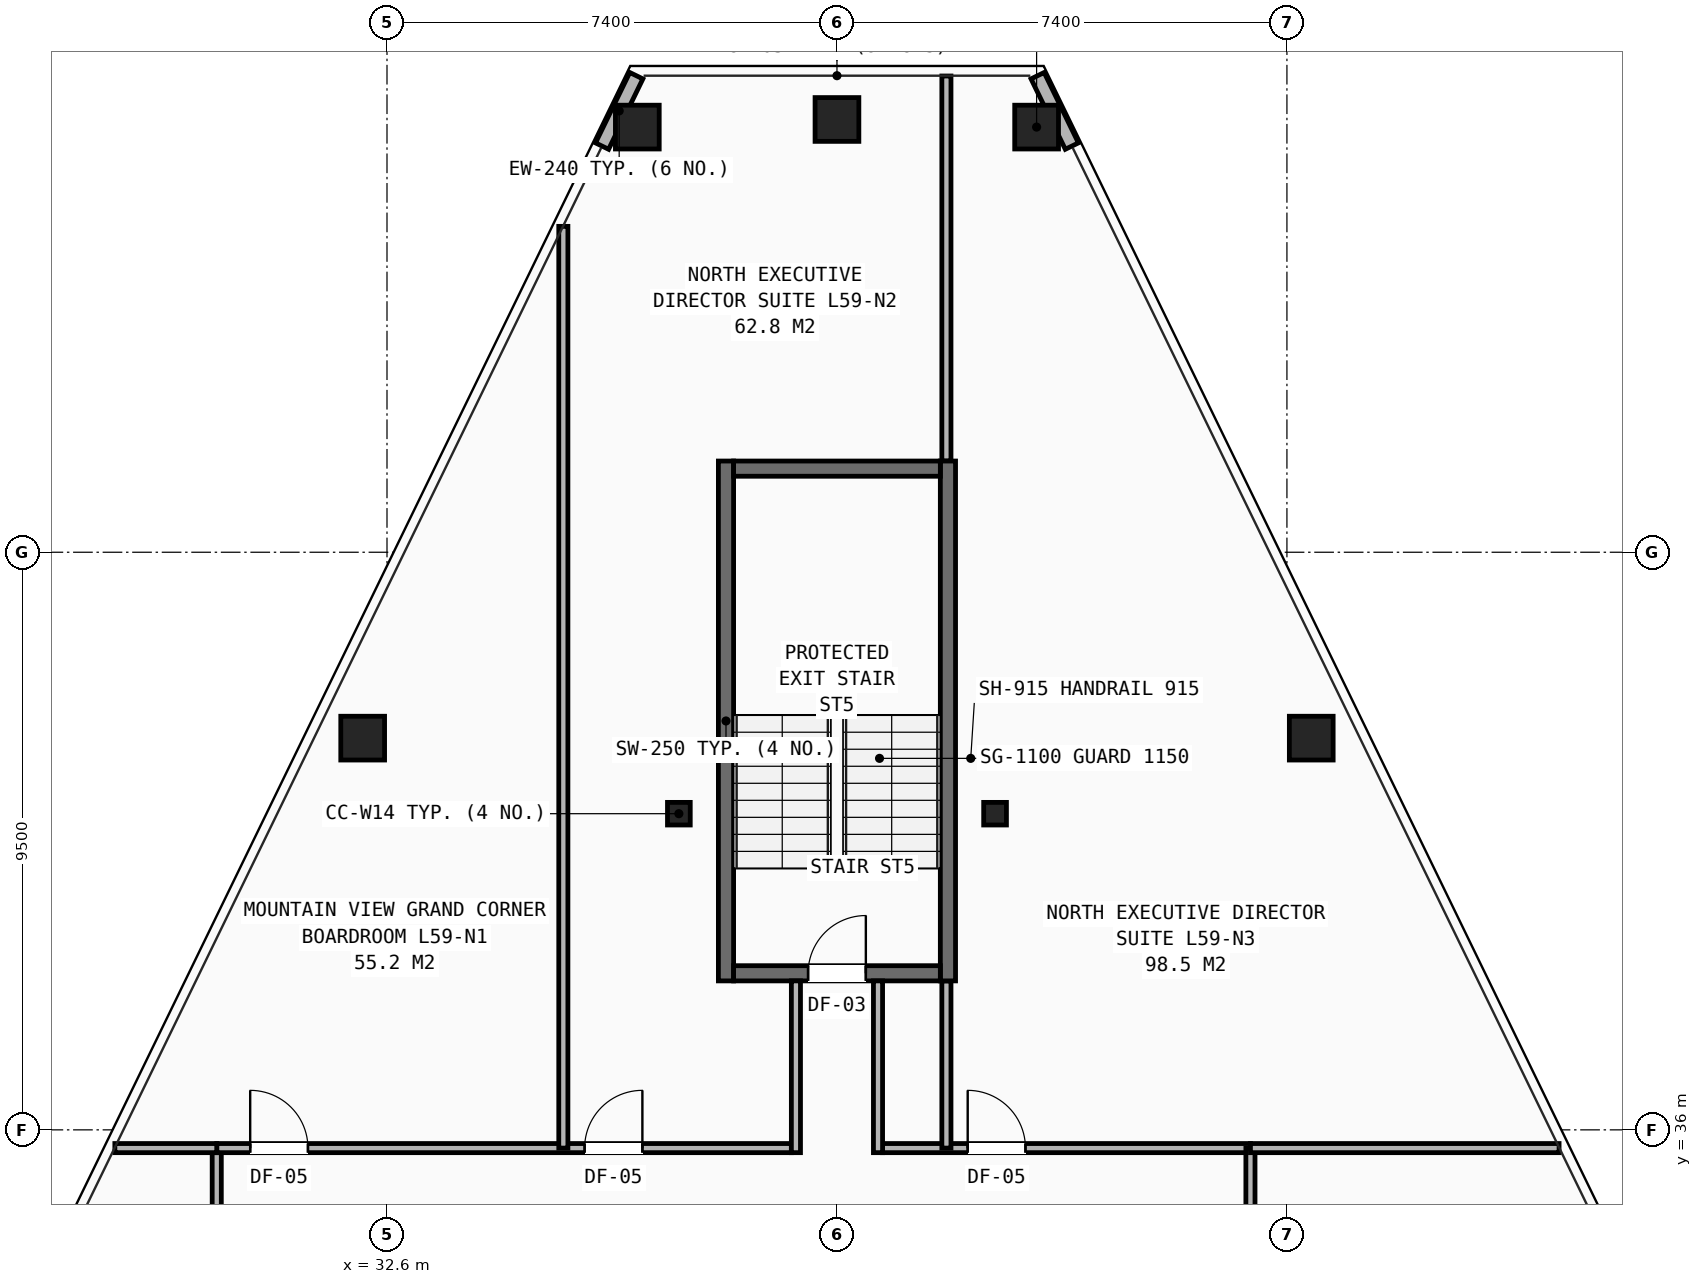
"""IFC4 building model, lengths in metres.
Left out: names, types, materials, properties, quantities, classifications, styles, units other than length and angle.
Written with IfcOpenShell. Run it as: python <this file> out.ifc"""

import sys

from ifc_helpers import new_model, si_unit, direction, frame, frame_2d, origin, origin_2d, place, context, subcontext, project, spatial, rectangle, hollow_rectangle, i_section, extrude, element, fill, save


model = new_model("IFC4")
c1 = context("Model", 3, precision=1e-05, world=origin(), true_north=direction((0.0, 1.0)))
c2 = subcontext(c1, "Body", "Model", "MODEL_VIEW")
j1 = project(units=[si_unit("LENGTHUNIT", "METRE"), si_unit("PLANEANGLEUNIT", "RADIAN")], contexts=[c1])
p1 = place(None, origin())
s1 = spatial("IfcSite", under=j1, at=p1, CompositionType="ELEMENT")
p2 = place(p1, origin())
s2 = spatial("IfcBuilding", under=s1, at=p2, CompositionType="ELEMENT")
p3 = place(p2, frame((0.0, 0.0, 208.4)))
s3 = spatial("IfcBuildingStorey", under=s2, at=p3, CompositionType="ELEMENT", Elevation=208.4)
for number, where, z_axis, x_axis in (
    (1, (37.4, 41.2, 0.0), (0.0, 0.0, 1.0), (1.0, 0.0, 0.0)),
    (2, (42.6, 41.2, 0.0), (0.0, 0.0, 1.0), (1.0, 0.0, 0.0)),
):
    element("IfcColumn", number, at=place(p3, frame(where, z_axis=z_axis, x_axis=x_axis)), inside=s3, PredefinedType="COLUMN", context=c2, shape_type="SweptSolid", body=[
        extrude(i_section(OverallWidth=0.374, OverallDepth=0.372, WebThickness=0.016, FlangeThickness=0.026, at=origin_2d()), origin(), (0.0, 0.0, 1.0), 3.5),
    ])
for number, where, z_axis, x_axis in (
    (3, (43.283, 52.492, 0.0), (0.0, 0.0, 1.0), (1.0, 0.0, 0.0)),
    (4, (40.0, 52.618, 0.0), (0.0, 0.0, 1.0), (1.0, 0.0, 0.0)),
    (5, (36.717, 52.492, 0.0), (0.0, 0.0, 1.0), (1.0, 0.0, 0.0)),
    (6, (32.2, 42.443, 0.0), (0.0, 0.0, 1.0), (1.0, 0.0, 0.0)),
    (7, (47.8, 42.443, 0.0), (0.0, 0.0, 1.0), (1.0, 0.0, 0.0)),
):
    element("IfcColumn", number, at=place(p3, frame(where, z_axis=z_axis, x_axis=x_axis)), inside=s3, PredefinedType="COLUMN", context=c2, shape_type="SweptSolid", body=[
        extrude(hollow_rectangle(XDim=0.72, YDim=0.72, WallThickness=0.05, at=origin_2d()), origin(), (0.0, 0.0, 1.0), 3.5),
    ])
for number, where, z_axis, x_axis in (
    (8, (36.7, 53.338, 0.0), (0.0, 0.0, 1.0), (-0.438, -0.899, 0.0)),
    (9, (43.863, 52.18, 0.0), (0.0, 0.0, 1.0), (-0.438, 0.899, 0.0)),
):
    element("IfcWall", number, at=place(p3, frame(where, z_axis=z_axis, x_axis=x_axis)), inside=s3, PredefinedType="SHEAR", context=c2, shape_type="SweptSolid", body=[
        extrude(rectangle(XDim=1.288, YDim=0.24, at=frame_2d((0.644, 0.0))), origin(), (0.0, 0.0, 1.0), 2.623),
    ])
p4 = place(p3, frame((29.8, 16.4, 0.0), z_axis=(0.0, 0.0, 1.0), x_axis=(0.0, 1.0, 0.0)))
e10 = element("IfcWall", 10, at=p4, inside=s3, PredefinedType="PARTITIONING", context=c2, shape_type="SweptSolid", body=[
    extrude(rectangle(XDim=19.3, YDim=0.15, at=frame_2d((9.65, 0.0))), origin(), (0.0, 0.0, 1.0), 2.292),
])
p5 = place(p4, frame((0.35, 0.0, 0.0)))
e11 = element("IfcOpeningElement", 11, at=p5, cuts=e10, PredefinedType="OPENING", context=c2, shape_type="SweptSolid", body=[
    extrude(rectangle(XDim=0.95, YDim=2.1, at=frame_2d((0.475, 1.05))), frame((0.0, 0.085, 0.0), z_axis=(0.0, -1.0, 0.0), x_axis=(1.0, 0.0, 0.0)), (0.0, 0.0, 1.0), 0.17),
])
p6 = place(p4, frame((4.45, 0.0, 0.0)))
e12 = element("IfcOpeningElement", 12, at=p6, cuts=e10, PredefinedType="OPENING", context=c2, shape_type="SweptSolid", body=[
    extrude(rectangle(XDim=0.95, YDim=2.1, at=frame_2d((0.475, 1.05))), frame((0.0, 0.085, 0.0), z_axis=(0.0, -1.0, 0.0), x_axis=(1.0, 0.0, 0.0)), (0.0, 0.0, 1.0), 0.17),
])
p7 = place(p4, frame((9.45, 0.0, 0.0)))
e13 = element("IfcOpeningElement", 13, at=p7, cuts=e10, PredefinedType="OPENING", context=c2, shape_type="SweptSolid", body=[
    extrude(rectangle(XDim=0.95, YDim=2.1, at=frame_2d((0.475, 1.05))), frame((0.0, 0.085, 0.0), z_axis=(0.0, -1.0, 0.0), x_axis=(1.0, 0.0, 0.0)), (0.0, 0.0, 1.0), 0.17),
])
p8 = place(p4, frame((14.75, 0.0, 0.0)))
e14 = element("IfcOpeningElement", 14, at=p8, cuts=e10, PredefinedType="OPENING", context=c2, shape_type="SweptSolid", body=[
    extrude(rectangle(XDim=0.95, YDim=2.1, at=frame_2d((0.475, 1.05))), frame((0.0, 0.085, 0.0), z_axis=(0.0, -1.0, 0.0), x_axis=(1.0, 0.0, 0.0)), (0.0, 0.0, 1.0), 0.17),
])
p9 = place(p3, frame((29.8, 35.7, 0.0), z_axis=(0.0, 0.0, 1.0), x_axis=(1.0, 0.0, 0.0)))
e15 = element("IfcWall", 15, at=p9, inside=s3, PredefinedType="PARTITIONING", context=c2, shape_type="SweptSolid", body=[
    extrude(rectangle(XDim=9.45, YDim=0.15, at=frame_2d((4.725, 0.0))), origin(), (0.0, 0.0, 1.0), 2.833),
])
p10 = place(p9, frame((0.55, 0.0, 0.0)))
e16 = element("IfcOpeningElement", 16, at=p10, cuts=e15, PredefinedType="OPENING", context=c2, shape_type="SweptSolid", body=[
    extrude(rectangle(XDim=0.95, YDim=2.1, at=frame_2d((0.475, 1.05))), frame((0.0, 0.085, 0.0), z_axis=(0.0, -1.0, 0.0), x_axis=(1.0, 0.0, 0.0)), (0.0, 0.0, 1.0), 0.17),
])
p11 = place(p9, frame((6.05, 0.0, 0.0)))
e17 = element("IfcOpeningElement", 17, at=p11, cuts=e15, PredefinedType="OPENING", context=c2, shape_type="SweptSolid", body=[
    extrude(rectangle(XDim=0.95, YDim=2.1, at=frame_2d((0.475, 1.05))), frame((0.0, 0.085, 0.0), z_axis=(0.0, -1.0, 0.0), x_axis=(1.0, 0.0, 0.0)), (0.0, 0.0, 1.0), 0.17),
])
p12 = place(p3, frame((40.75, 35.7, 0.0), z_axis=(0.0, 0.0, 1.0), x_axis=(1.0, 0.0, 0.0)))
e18 = element("IfcWall", 18, at=p12, inside=s3, PredefinedType="PARTITIONING", context=c2, shape_type="SweptSolid", body=[
    extrude(rectangle(XDim=6.05, YDim=0.15, at=frame_2d((3.025, 0.0))), origin(), (0.0, 0.0, 1.0), 3.25),
])
p13 = place(p12, frame((1.4, 0.0, 0.0)))
e19 = element("IfcOpeningElement", 19, at=p13, cuts=e18, PredefinedType="OPENING", context=c2, shape_type="SweptSolid", body=[
    extrude(rectangle(XDim=0.95, YDim=2.1, at=frame_2d((0.475, 1.05))), frame((0.0, 0.085, 0.0), z_axis=(0.0, -1.0, 0.0), x_axis=(1.0, 0.0, 0.0)), (0.0, 0.0, 1.0), 0.17),
])
p14 = place(p3, frame((46.8, 31.2, 0.0), z_axis=(0.0, 0.0, 1.0), x_axis=(0.0, 1.0, 0.0)))
e20 = element("IfcWall", 20, at=p14, inside=s3, PredefinedType="PARTITIONING", context=c2, shape_type="SweptSolid", body=[
    extrude(rectangle(XDim=4.5, YDim=0.15, at=frame_2d((2.25, 0.0))), origin(), (0.0, 0.0, 1.0), 2.705),
])
p15 = place(p3, frame((28.124, 35.7, 0.0), z_axis=(0.0, 0.0, 1.0), x_axis=(1.0, 0.0, 0.0)))
e21 = element("IfcWall", 21, at=p15, inside=s3, PredefinedType="PARTITIONING", context=c2, shape_type="SweptSolid", body=[
    extrude(rectangle(XDim=1.676, YDim=0.15, at=frame_2d((0.838, 0.0))), origin(), (0.0, 0.0, 1.0), 2.628),
])
p16 = place(p3, frame((46.8, 35.7, 0.0), z_axis=(0.0, 0.0, 1.0), x_axis=(1.0, 0.0, 0.0)))
e22 = element("IfcWall", 22, at=p16, inside=s3, PredefinedType="PARTITIONING", context=c2, shape_type="SweptSolid", body=[
    extrude(rectangle(XDim=5.076, YDim=0.15, at=frame_2d((2.538, 0.0))), origin(), (0.0, 0.0, 1.0), 2.628),
])
p17 = place(p3, frame((35.5, 35.7, 0.0), z_axis=(0.0, 0.0, 1.0), x_axis=(0.0, 1.0, 0.0)))
e23 = element("IfcWall", 23, at=p17, inside=s3, PredefinedType="PARTITIONING", context=c2, shape_type="SweptSolid", body=[
    extrude(rectangle(XDim=15.16, YDim=0.15, at=frame_2d((7.58, 0.0))), origin(), (0.0, 0.0, 1.0), 2.292),
])
p18 = place(p3, frame((41.8, 35.7, 0.0), z_axis=(0.0, 0.0, 1.0), x_axis=(0.0, 1.0, 0.0)))
e24 = element("IfcWall", 24, at=p18, inside=s3, PredefinedType="PARTITIONING", context=c2, shape_type="SweptSolid", body=[
    extrude(rectangle(XDim=2.75, YDim=0.15, at=frame_2d((1.375, 0.0))), origin(), (0.0, 0.0, 1.0), 3.25),
])
p19 = place(p3, frame((41.8, 47.0, 0.0), z_axis=(0.0, 0.0, 1.0), x_axis=(0.0, 1.0, 0.0)))
e25 = element("IfcWall", 25, at=p19, inside=s3, PredefinedType="PARTITIONING", context=c2, shape_type="SweptSolid", body=[
    extrude(rectangle(XDim=6.333, YDim=0.15, at=frame_2d((3.167, 0.0))), origin(), (0.0, 0.0, 1.0), 2.628),
])
for number, where, z_axis, x_axis in (
    (26, (38.175, 38.45, 0.0), (0.0, 0.0, 1.0), (0.0, 1.0, 0.0)),
    (27, (41.825, 38.45, 0.0), (0.0, 0.0, 1.0), (0.0, 1.0, 0.0)),
):
    element("IfcWall", number, at=place(p3, frame(where, z_axis=z_axis, x_axis=x_axis)), inside=s3, PredefinedType="SHEAR", context=c2, shape_type="SweptSolid", body=[
        extrude(rectangle(XDim=8.55, YDim=0.25, at=frame_2d((4.275, 0.0))), origin(), (0.0, 0.0, 1.0), 3.25),
    ])
p20 = place(p3, frame((38.3, 38.575, 0.0), z_axis=(0.0, 0.0, 1.0), x_axis=(1.0, 0.0, 0.0)))
e28 = element("IfcWall", 28, at=p20, inside=s3, PredefinedType="SHEAR", context=c2, shape_type="SweptSolid", body=[
    extrude(rectangle(XDim=3.4, YDim=0.25, at=frame_2d((1.7, 0.0))), origin(), (0.0, 0.0, 1.0), 3.25),
])
p21 = place(p20, frame((1.225, 0.0, 0.0)))
e29 = element("IfcOpeningElement", 29, at=p21, cuts=e28, PredefinedType="OPENING", context=c2, shape_type="SweptSolid", body=[
    extrude(rectangle(XDim=0.95, YDim=2.1, at=frame_2d((0.475, 1.05))), frame((0.0, 0.135, 0.0), z_axis=(0.0, -1.0, 0.0), x_axis=(1.0, 0.0, 0.0)), (0.0, 0.0, 1.0), 0.27),
])
p22 = place(p3, frame((38.3, 46.875, 0.0), z_axis=(0.0, 0.0, 1.0), x_axis=(1.0, 0.0, 0.0)))
e30 = element("IfcWall", 30, at=p22, inside=s3, PredefinedType="SHEAR", context=c2, shape_type="SweptSolid", body=[
    extrude(rectangle(XDim=3.4, YDim=0.25, at=frame_2d((1.7, 0.0))), origin(), (0.0, 0.0, 1.0), 3.25),
])
for number, where, z_axis, x_axis in (
    (31, (39.325, 35.625, 0.0), (0.0, 0.0, 1.0), (0.0, 1.0, 0.0)),
    (32, (40.675, 35.625, 0.0), (0.0, 0.0, 1.0), (0.0, 1.0, 0.0)),
):
    element("IfcWall", number, at=place(p3, frame(where, z_axis=z_axis, x_axis=x_axis)), inside=s3, PredefinedType="PARTITIONING", context=c2, shape_type="SweptSolid", body=[
        extrude(rectangle(XDim=2.825, YDim=0.15, at=frame_2d((1.413, 0.0))), origin(), (0.0, 0.0, 1.0), 3.25),
    ])
p23 = place(p10, origin())
e33 = element("IfcDoor", 33, at=p23, inside=s3, OperationType="SINGLE_SWING_LEFT", PredefinedType="DOOR", context=c2, shape_type="SweptSolid", body=[
    extrude(rectangle(XDim=0.95, YDim=2.1, at=frame_2d((0.475, 1.05))), frame((0.0, 0.025, 0.0), z_axis=(0.0, -1.0, 0.0), x_axis=(1.0, 0.0, 0.0)), (0.0, 0.0, 1.0), 0.05),
])
fill(e16, e33)
p24 = place(p11, origin())
e34 = element("IfcDoor", 34, at=p24, inside=s3, OperationType="SINGLE_SWING_RIGHT", PredefinedType="DOOR", context=c2, shape_type="SweptSolid", body=[
    extrude(rectangle(XDim=0.95, YDim=2.1, at=frame_2d((0.475, 1.05))), frame((0.0, 0.025, 0.0), z_axis=(0.0, -1.0, 0.0), x_axis=(1.0, 0.0, 0.0)), (0.0, 0.0, 1.0), 0.05),
])
fill(e17, e34)
p25 = place(p13, origin())
e35 = element("IfcDoor", 35, at=p25, inside=s3, OperationType="SINGLE_SWING_LEFT", PredefinedType="DOOR", context=c2, shape_type="SweptSolid", body=[
    extrude(rectangle(XDim=0.95, YDim=2.1, at=frame_2d((0.475, 1.05))), frame((0.0, 0.025, 0.0), z_axis=(0.0, -1.0, 0.0), x_axis=(1.0, 0.0, 0.0)), (0.0, 0.0, 1.0), 0.05),
])
fill(e19, e35)
p26 = place(p21, origin())
e36 = element("IfcDoor", 36, at=p26, inside=s3, OperationType="SINGLE_SWING_RIGHT", PredefinedType="DOOR", context=c2, shape_type="SweptSolid", body=[
    extrude(rectangle(XDim=0.95, YDim=2.1, at=frame_2d((0.475, 1.05))), frame((0.0, 0.025, 0.0), z_axis=(0.0, -1.0, 0.0), x_axis=(1.0, 0.0, 0.0)), (0.0, 0.0, 1.0), 0.05),
])
fill(e29, e36)
save(model, sys.argv[1])
